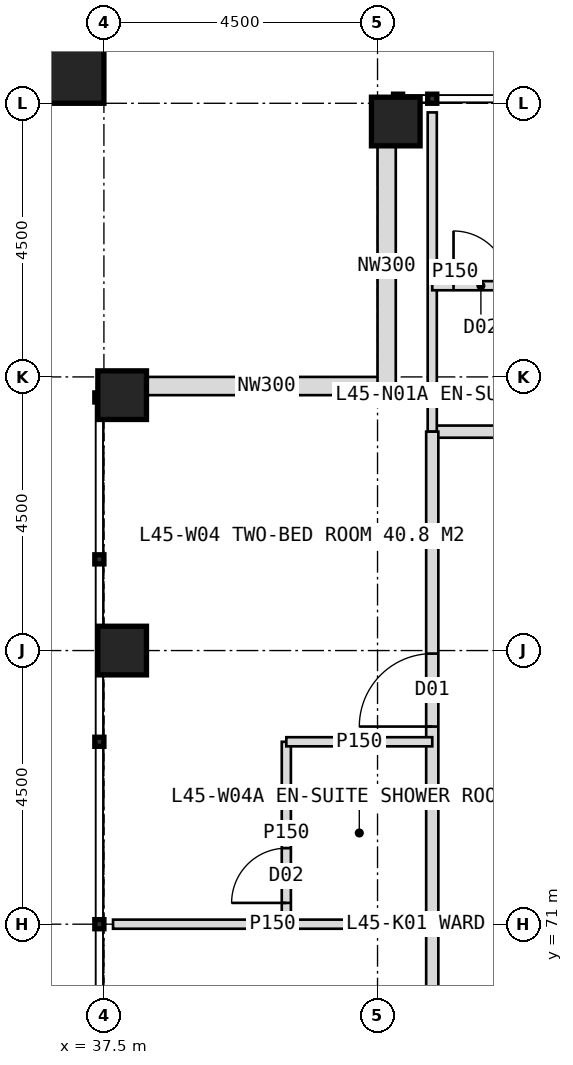
"""IFC4 building model, lengths in metres.
Left out: names, types, materials, properties, quantities, classifications, styles, units other than length and angle.
Written with IfcOpenShell. Run it as: python <this file> out.ifc"""

import sys

from ifc_helpers import new_model, si_unit, direction, frame, frame_2d, origin, origin_2d, place, context, subcontext, project, spatial, rectangle, hollow_rectangle, extrude, element, fill, save


model = new_model("IFC4")
c1 = context("Model", 3, precision=1e-05, world=origin(), true_north=direction((0.0, 1.0)))
c2 = subcontext(c1, "Body", "Model", "MODEL_VIEW")
j1 = project(units=[si_unit("LENGTHUNIT", "METRE"), si_unit("PLANEANGLEUNIT", "RADIAN")], contexts=[c1])
p1 = place(None, origin())
s1 = spatial("IfcSite", under=j1, at=p1, CompositionType="ELEMENT")
p2 = place(p1, origin())
s2 = spatial("IfcBuilding", under=s1, at=p2, CompositionType="ELEMENT")
p3 = place(p2, frame((0.0, 0.0, 189.0)))
s3 = spatial("IfcBuildingStorey", under=s2, at=p3, CompositionType="ELEMENT", Elevation=189.0)
for number, where, z_axis, x_axis in (
    (1, (42.3, 84.2, 0.0), (0.0, 0.0, 1.0), (1.0, 0.0, 0.0)),
    (2, (37.8, 75.5, 0.0), (0.0, 0.0, 1.0), (1.0, 0.0, 0.0)),
    (3, (37.8, 79.7, 0.0), (0.0, 0.0, 1.0), (1.0, 0.0, 0.0)),
):
    element("IfcColumn", number, at=place(p3, frame(where, z_axis=z_axis, x_axis=x_axis)), inside=s3, PredefinedType="COLUMN", context=c2, shape_type="SweptSolid", body=[
        extrude(hollow_rectangle(XDim=0.8, YDim=0.8, WallThickness=0.08, at=origin_2d()), origin(), (0.0, 0.0, 1.0), 4.0),
    ])
p4 = place(p3, frame((36.9, 85.1, 0.0), z_axis=(0.0, 0.0, 1.0), x_axis=(1.0, 0.0, 0.0)))
e4 = element("IfcColumn", 4, at=p4, inside=s3, PredefinedType="COLUMN", context=c2, shape_type="SweptSolid", body=[
    extrude(hollow_rectangle(XDim=1.2, YDim=1.2, WallThickness=0.07, at=origin_2d()), origin(), (0.0, 0.0, 1.0), 4.0),
])
for number, where, z_axis, x_axis in (
    (5, (38.2, 79.85, 0.0), (0.0, 0.0, 1.0), (1.0, 0.0, 0.0)),
    (6, (42.15, 79.85, 0.0), (0.0, 0.0, 1.0), (0.0, 1.0, 0.0)),
):
    element("IfcWall", number, at=place(p3, frame(where, z_axis=z_axis, x_axis=x_axis)), inside=s3, PredefinedType="ELEMENTEDWALL", context=c2, shape_type="SweptSolid", body=[
        extrude(rectangle(XDim=3.95, YDim=0.3, at=frame_2d((1.975, 0.0))), origin(), (0.0, 0.0, 1.0), 2.85),
    ])
p5 = place(p3, frame((42.9, 79.1, 0.0), z_axis=(0.0, 0.0, 1.0), x_axis=(1.0, 0.0, 0.0)))
e7 = element("IfcWall", 7, at=p5, inside=s3, PredefinedType="PARTITIONING", context=c2, shape_type="SweptSolid", body=[
    extrude(rectangle(XDim=34.2, YDim=0.2, at=frame_2d((17.1, 0.0))), origin(), (0.0, 0.0, 1.0), 3.75),
])
p6 = place(p5, frame((3.25, 0.0, 0.0)))
e8 = element("IfcOpeningElement", 8, at=p6, cuts=e7, PredefinedType="OPENING", context=c2, shape_type="SweptSolid", body=[
    extrude(rectangle(XDim=1.2, YDim=2.2, at=frame_2d((0.6, 1.1))), frame((0.0, 0.11, 0.0), z_axis=(0.0, -1.0, 0.0), x_axis=(1.0, 0.0, 0.0)), (0.0, 0.0, 1.0), 0.22),
])
p7 = place(p5, frame((10.6, 0.0, 0.0)))
e9 = element("IfcOpeningElement", 9, at=p7, cuts=e7, PredefinedType="OPENING", context=c2, shape_type="SweptSolid", body=[
    extrude(rectangle(XDim=1.0, YDim=2.1, at=frame_2d((0.5, 1.05))), frame((0.0, 0.11, 0.0), z_axis=(0.0, -1.0, 0.0), x_axis=(1.0, 0.0, 0.0)), (0.0, 0.0, 1.0), 0.22),
])
p8 = place(p5, frame((17.35, 0.0, 0.0)))
e10 = element("IfcOpeningElement", 10, at=p8, cuts=e7, PredefinedType="OPENING", context=c2, shape_type="SweptSolid", body=[
    extrude(rectangle(XDim=1.2, YDim=2.2, at=frame_2d((0.6, 1.1))), frame((0.0, 0.11, 0.0), z_axis=(0.0, -1.0, 0.0), x_axis=(1.0, 0.0, 0.0)), (0.0, 0.0, 1.0), 0.22),
])
p9 = place(p5, frame((25.75, 0.0, 0.0)))
e11 = element("IfcOpeningElement", 11, at=p9, cuts=e7, PredefinedType="OPENING", context=c2, shape_type="SweptSolid", body=[
    extrude(rectangle(XDim=1.2, YDim=2.2, at=frame_2d((0.6, 1.1))), frame((0.0, 0.11, 0.0), z_axis=(0.0, -1.0, 0.0), x_axis=(1.0, 0.0, 0.0)), (0.0, 0.0, 1.0), 0.22),
])
p10 = place(p3, frame((42.9, 79.1, 0.0), z_axis=(0.0, 0.0, 1.0), x_axis=(0.0, 1.0, 0.0)))
e12 = element("IfcWall", 12, at=p10, inside=s3, PredefinedType="PARTITIONING", context=c2, shape_type="SweptSolid", body=[
    extrude(rectangle(XDim=5.25, YDim=0.15, at=frame_2d((2.625, 0.0))), origin(), (0.0, 0.0, 1.0), 3.75),
])
p11 = place(p3, frame((42.9, 81.5, 0.0), z_axis=(0.0, 0.0, 1.0), x_axis=(1.0, 0.0, 0.0)))
e13 = element("IfcWall", 13, at=p11, inside=s3, PredefinedType="PARTITIONING", context=c2, shape_type="SweptSolid", body=[
    extrude(rectangle(XDim=3.0, YDim=0.15, at=frame_2d((1.5, 0.0))), origin(), (0.0, 0.0, 1.0), 3.75),
])
p12 = place(p11, frame((0.35, 0.0, 0.0)))
e14 = element("IfcOpeningElement", 14, at=p12, cuts=e13, PredefinedType="OPENING", context=c2, shape_type="SweptSolid", body=[
    extrude(rectangle(XDim=0.9, YDim=2.1, at=frame_2d((0.45, 1.05))), frame((0.0, 0.085, 0.0), z_axis=(0.0, -1.0, 0.0), x_axis=(1.0, 0.0, 0.0)), (0.0, 0.0, 1.0), 0.17),
])
p13 = place(p3, frame((42.9, 71.0, 0.0), z_axis=(0.0, 0.0, 1.0), x_axis=(-1.0, 0.0, 0.0)))
e15 = element("IfcWall", 15, at=p13, inside=s3, PredefinedType="PARTITIONING", context=c2, shape_type="SweptSolid", body=[
    extrude(rectangle(XDim=5.25, YDim=0.15, at=frame_2d((2.625, 0.0))), origin(), (0.0, 0.0, 1.0), 3.75),
])
p14 = place(p3, frame((42.9, 44.9, 0.0), z_axis=(0.0, 0.0, 1.0), x_axis=(0.0, 1.0, 0.0)))
e16 = element("IfcWall", 16, at=p14, inside=s3, PredefinedType="PARTITIONING", context=c2, shape_type="SweptSolid", body=[
    extrude(rectangle(XDim=34.2, YDim=0.2, at=frame_2d((17.1, 0.0))), origin(), (0.0, 0.0, 1.0), 3.75),
])
p15 = place(p14, frame((3.25, 0.0, 0.0)))
e17 = element("IfcOpeningElement", 17, at=p15, cuts=e16, PredefinedType="OPENING", context=c2, shape_type="SweptSolid", body=[
    extrude(rectangle(XDim=1.2, YDim=2.2, at=frame_2d((0.6, 1.1))), frame((0.0, 0.11, 0.0), z_axis=(0.0, -1.0, 0.0), x_axis=(1.0, 0.0, 0.0)), (0.0, 0.0, 1.0), 0.22),
])
p16 = place(p14, frame((11.35, 0.0, 0.0)))
e18 = element("IfcOpeningElement", 18, at=p16, cuts=e16, PredefinedType="OPENING", context=c2, shape_type="SweptSolid", body=[
    extrude(rectangle(XDim=1.2, YDim=2.2, at=frame_2d((0.6, 1.1))), frame((0.0, 0.11, 0.0), z_axis=(0.0, -1.0, 0.0), x_axis=(1.0, 0.0, 0.0)), (0.0, 0.0, 1.0), 0.22),
])
p17 = place(p14, frame((20.35, 0.0, 0.0)))
e19 = element("IfcOpeningElement", 19, at=p17, cuts=e16, PredefinedType="OPENING", context=c2, shape_type="SweptSolid", body=[
    extrude(rectangle(XDim=1.2, YDim=2.2, at=frame_2d((0.6, 1.1))), frame((0.0, 0.11, 0.0), z_axis=(0.0, -1.0, 0.0), x_axis=(1.0, 0.0, 0.0)), (0.0, 0.0, 1.0), 0.22),
])
p18 = place(p14, frame((29.35, 0.0, 0.0)))
e20 = element("IfcOpeningElement", 20, at=p18, cuts=e16, PredefinedType="OPENING", context=c2, shape_type="SweptSolid", body=[
    extrude(rectangle(XDim=1.2, YDim=2.2, at=frame_2d((0.6, 1.1))), frame((0.0, 0.11, 0.0), z_axis=(0.0, -1.0, 0.0), x_axis=(1.0, 0.0, 0.0)), (0.0, 0.0, 1.0), 0.22),
])
p19 = place(p3, frame((40.5, 71.0, 0.0), z_axis=(0.0, 0.0, 1.0), x_axis=(0.0, 1.0, 0.0)))
e21 = element("IfcWall", 21, at=p19, inside=s3, PredefinedType="PARTITIONING", context=c2, shape_type="SweptSolid", body=[
    extrude(rectangle(XDim=3.0, YDim=0.15, at=frame_2d((1.5, 0.0))), origin(), (0.0, 0.0, 1.0), 3.75),
])
p20 = place(p19, frame((0.35, 0.0, 0.0)))
e22 = element("IfcOpeningElement", 22, at=p20, cuts=e21, PredefinedType="OPENING", context=c2, shape_type="SweptSolid", body=[
    extrude(rectangle(XDim=0.9, YDim=2.1, at=frame_2d((0.45, 1.05))), frame((0.0, 0.085, 0.0), z_axis=(0.0, -1.0, 0.0), x_axis=(1.0, 0.0, 0.0)), (0.0, 0.0, 1.0), 0.17),
])
p21 = place(p3, frame((42.9, 74.0, 0.0), z_axis=(0.0, 0.0, 1.0), x_axis=(-1.0, 0.0, 0.0)))
e23 = element("IfcWall", 23, at=p21, inside=s3, PredefinedType="PARTITIONING", context=c2, shape_type="SweptSolid", body=[
    extrude(rectangle(XDim=2.4, YDim=0.15, at=frame_2d((1.2, 0.0))), origin(), (0.0, 0.0, 1.0), 3.75),
])
p22 = place(p12, origin())
e24 = element("IfcDoor", 24, at=p22, inside=s3, OperationType="SINGLE_SWING_LEFT", PredefinedType="DOOR", context=c2, shape_type="SweptSolid", body=[
    extrude(rectangle(XDim=0.9, YDim=2.1, at=frame_2d((0.45, 1.05))), frame((0.0, 0.025, 0.0), z_axis=(0.0, -1.0, 0.0), x_axis=(1.0, 0.0, 0.0)), (0.0, 0.0, 1.0), 0.05),
])
fill(e14, e24)
p23 = place(p18, origin())
e25 = element("IfcDoor", 25, at=p23, inside=s3, OperationType="SINGLE_SWING_LEFT", PredefinedType="DOOR", context=c2, shape_type="SweptSolid", body=[
    extrude(rectangle(XDim=1.2, YDim=2.2, at=frame_2d((0.6, 1.1))), frame((0.0, 0.025, 0.0), z_axis=(0.0, -1.0, 0.0), x_axis=(1.0, 0.0, 0.0)), (0.0, 0.0, 1.0), 0.05),
])
fill(e20, e25)
p24 = place(p20, origin())
e26 = element("IfcDoor", 26, at=p24, inside=s3, OperationType="SINGLE_SWING_LEFT", PredefinedType="DOOR", context=c2, shape_type="SweptSolid", body=[
    extrude(rectangle(XDim=0.9, YDim=2.1, at=frame_2d((0.45, 1.05))), frame((0.0, 0.025, 0.0), z_axis=(0.0, -1.0, 0.0), x_axis=(1.0, 0.0, 0.0)), (0.0, 0.0, 1.0), 0.05),
])
fill(e22, e26)
save(model, sys.argv[1])
